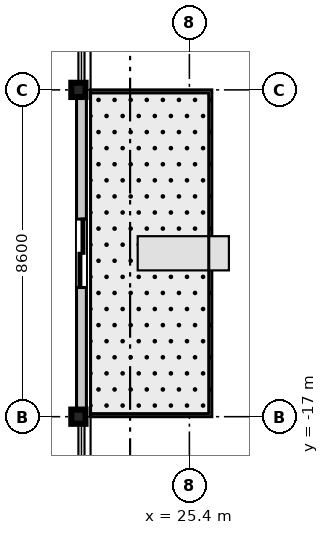
"""IFC4 building model, lengths in metres.
Left out: names, types, materials, properties, quantities, classifications, styles, units other than length and angle.
Written with IfcOpenShell. Run it as: python <this file> out.ifc"""

import sys

from ifc_helpers import new_model, si_unit, direction, frame, frame_2d, origin, origin_2d, place, context, subcontext, project, spatial, rectangle, i_section, extrude, source, transform, mapped, element, fill, save


model = new_model("IFC4")
c1 = context("Model", 3, precision=1e-05, world=origin(), true_north=direction((0.0, 1.0)))
c2 = subcontext(c1, "Body", "Model", "MODEL_VIEW")
j1 = project(units=[si_unit("LENGTHUNIT", "METRE"), si_unit("PLANEANGLEUNIT", "RADIAN")], contexts=[c1])
p1 = place(None, origin())
s1 = spatial("IfcSite", under=j1, at=p1, CompositionType="ELEMENT")
p2 = place(p1, origin())
s2 = spatial("IfcBuilding", under=s1, at=p2, CompositionType="ELEMENT")
p3 = place(p2, frame((0.0, 0.0, 327.15)))
s3 = spatial("IfcBuildingStorey", under=s2, at=p3, CompositionType="ELEMENT", Elevation=327.15)
m1 = source(origin(), c2, "Body", "SweptSolid", [
    extrude(i_section(OverallWidth=0.374, OverallDepth=0.374, WebThickness=0.014, FlangeThickness=0.023, at=origin_2d()), origin(), (0.0, 0.0, 1.0), 3.755),
])
for number, where, z_axis, x_axis in (
    (1, (22.48, -17.0, 0.0), (0.0, 0.0, 1.0), (1.0, 0.0, 0.0)),
    (2, (22.48, -8.4, 0.0), (0.0, 0.0, 1.0), (1.0, 0.0, 0.0)),
):
    element("IfcColumn", number, at=place(p3, frame(where, z_axis=z_axis, x_axis=x_axis)), inside=s3, PredefinedType="COLUMN", context=c2, shape_type="MappedRepresentation", body=[
        mapped(m1, transform((0.0, 0.0, 0.0), scale=1.0)),
    ])
m2 = source(origin(), c2, "Body", "SweptSolid", [
    extrude(rectangle(XDim=8.6, YDim=0.26, at=frame_2d((4.3, 0.0))), origin(), (0.0, 0.0, 1.0), 2.98),
])
p4 = place(p3, frame((22.56, -17.0, 0.0), z_axis=(0.0, 0.0, 1.0), x_axis=(0.0, 1.0, 0.0)))
e3 = element("IfcWall", 3, at=p4, inside=s3, PredefinedType="STANDARD", context=c2, shape_type="MappedRepresentation", body=[
    mapped(m2, transform((0.0, 0.0, 0.0), scale=1.0)),
])
p5 = place(p4, frame((3.4, 0.0, 0.0)))
e4 = element("IfcOpeningElement", 4, at=p5, cuts=e3, PredefinedType="OPENING", context=c2, shape_type="SweptSolid", body=[
    extrude(rectangle(XDim=1.8, YDim=2.25, at=frame_2d((0.9, 1.125))), frame((0.0, 0.14, 0.0), z_axis=(0.0, -1.0, 0.0), x_axis=(1.0, 0.0, 0.0)), (0.0, 0.0, 1.0), 0.28),
])
m3 = source(origin(), c2, "Body", "SweptSolid", [
    extrude(rectangle(XDim=1.8, YDim=2.25, at=frame_2d((0.9, 1.125))), frame((0.0, 0.025, 0.0), z_axis=(0.0, -1.0, 0.0), x_axis=(1.0, 0.0, 0.0)), (0.0, 0.0, 1.0), 0.05),
])
p6 = place(p5, frame((1.8, 0.0, 0.0), z_axis=(0.0, 0.0, 1.0), x_axis=(-1.0, 0.0, 0.0)))
e5 = element("IfcDoor", 5, at=p6, inside=s3, OperationType="DOUBLE_DOOR_SLIDING", PredefinedType="DOOR", context=c2, shape_type="MappedRepresentation", body=[
    mapped(m3, transform((0.0, 0.0, 0.0), scale=1.0)),
])
fill(e4, e5)
save(model, sys.argv[1])
